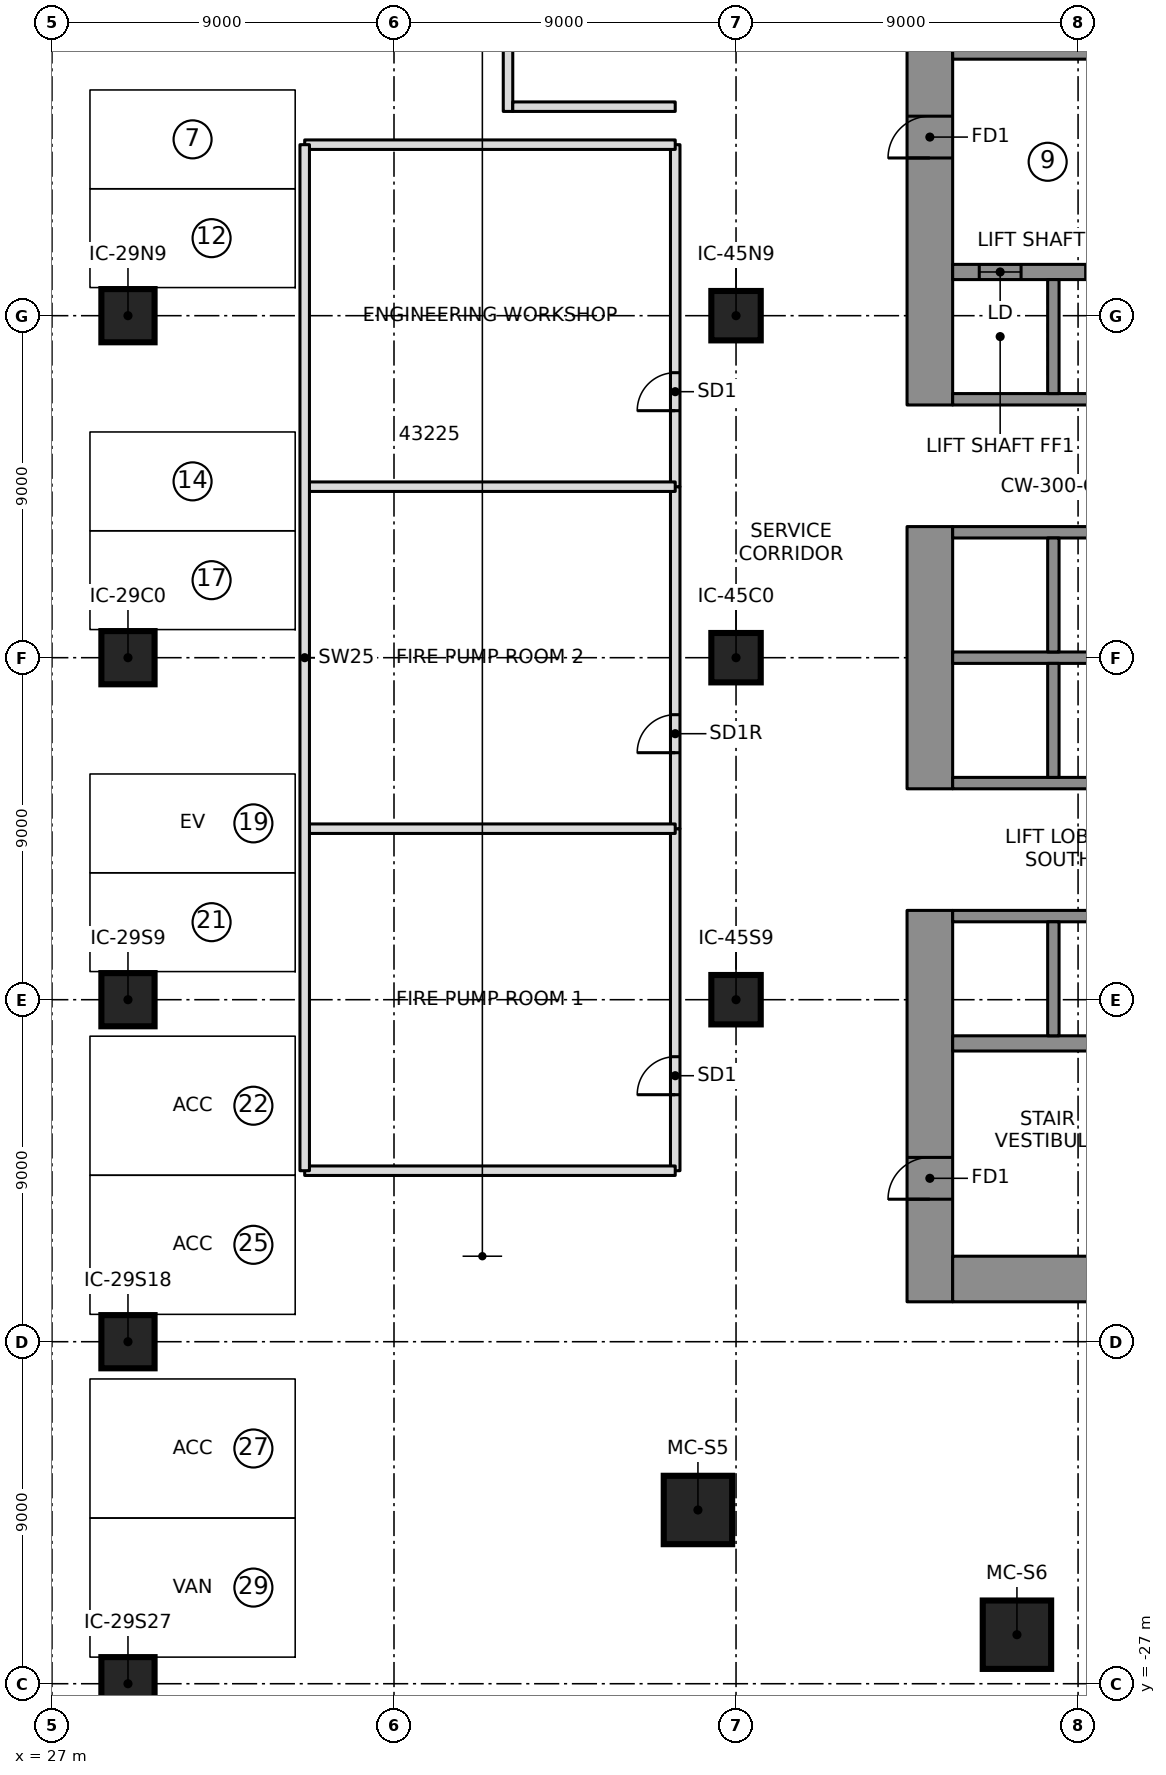
"""IFC4 building model, lengths in metres.
Left out: names, types, materials, properties, quantities, classifications, styles, units other than length and angle.
Written with IfcOpenShell. Run it as: python <this file> out.ifc"""

import sys

from ifc_helpers import new_model, si_unit, direction, frame, frame_2d, origin, origin_2d, place, context, subcontext, project, spatial, rectangle, extrude, element, fill, save


model = new_model("IFC4")
c1 = context("Model", 3, precision=1e-05, world=origin(), true_north=direction((0.0, 1.0)))
c2 = subcontext(c1, "Body", "Model", "MODEL_VIEW")
j1 = project(units=[si_unit("LENGTHUNIT", "METRE"), si_unit("PLANEANGLEUNIT", "RADIAN")], contexts=[c1])
p1 = place(None, origin())
s1 = spatial("IfcSite", under=j1, at=p1, CompositionType="ELEMENT")
p2 = place(p1, origin())
s2 = spatial("IfcBuilding", under=s1, at=p2, CompositionType="ELEMENT")
p3 = place(p2, frame((0.0, 0.0, -5.0)))
s3 = spatial("IfcBuildingStorey", under=s2, at=p3, CompositionType="ELEMENT", Elevation=-5.0)
p4 = place(p3, frame((50.1, 6.65, 0.0), z_axis=(0.0, 0.0, 1.0), x_axis=(0.0, 1.0, 0.0)))
e1 = element("IfcWall", 1, at=p4, inside=s3, PredefinedType="SHEAR", context=c2, shape_type="SweptSolid", body=[
    extrude(rectangle(XDim=10.3, YDim=1.2, at=frame_2d((5.15, 0.0))), origin(), (0.0, 0.0, 1.0), 5.0),
])
p5 = place(p4, frame((6.5, 0.0, 0.0)))
e2 = element("IfcOpeningElement", 2, at=p5, cuts=e1, PredefinedType="OPENING", context=c2, shape_type="SweptSolid", body=[
    extrude(rectangle(XDim=1.1, YDim=2.1, at=frame_2d((0.55, 1.05))), frame((0.0, 0.61, 0.0), z_axis=(0.0, -1.0, 0.0), x_axis=(1.0, 0.0, 0.0)), (0.0, 0.0, 1.0), 1.22),
])
p6 = place(p3, frame((50.1, -3.45, 0.0), z_axis=(0.0, 0.0, 1.0), x_axis=(0.0, 1.0, 0.0)))
e3 = element("IfcWall", 3, at=p6, inside=s3, PredefinedType="SHEAR", context=c2, shape_type="SweptSolid", body=[
    extrude(rectangle(XDim=6.9, YDim=1.2, at=frame_2d((3.45, 0.0))), origin(), (0.0, 0.0, 1.0), 5.0),
])
p7 = place(p3, frame((50.1, -16.95, 0.0), z_axis=(0.0, 0.0, 1.0), x_axis=(0.0, 1.0, 0.0)))
e4 = element("IfcWall", 4, at=p7, inside=s3, PredefinedType="SHEAR", context=c2, shape_type="SweptSolid", body=[
    extrude(rectangle(XDim=10.3, YDim=1.2, at=frame_2d((5.15, 0.0))), origin(), (0.0, 0.0, 1.0), 5.0),
])
p8 = place(p7, frame((2.7, 0.0, 0.0)))
e5 = element("IfcOpeningElement", 5, at=p8, cuts=e4, PredefinedType="OPENING", context=c2, shape_type="SweptSolid", body=[
    extrude(rectangle(XDim=1.1, YDim=2.1, at=frame_2d((0.55, 1.05))), frame((0.0, 0.61, 0.0), z_axis=(0.0, -1.0, 0.0), x_axis=(1.0, 0.0, 0.0)), (0.0, 0.0, 1.0), 1.22),
])
for number, where, z_axis, x_axis in (
    (6, (50.7, 16.35, 0.0), (0.0, 0.0, 1.0), (1.0, 0.0, 0.0)),
    (7, (50.7, -16.35, 0.0), (0.0, 0.0, 1.0), (1.0, 0.0, 0.0)),
):
    element("IfcWall", number, at=place(p3, frame(where, z_axis=z_axis, x_axis=x_axis)), inside=s3, PredefinedType="SHEAR", context=c2, shape_type="SweptSolid", body=[
        extrude(rectangle(XDim=15.06, YDim=1.2, at=frame_2d((7.53, 0.0))), origin(), (0.0, 0.0, 1.0), 5.0),
    ])
p9 = place(p3, frame((50.7, 10.15, 0.0), z_axis=(0.0, 0.0, 1.0), x_axis=(1.0, 0.0, 0.0)))
e8 = element("IfcWall", 8, at=p9, inside=s3, PredefinedType="SHEAR", context=c2, shape_type="SweptSolid", body=[
    extrude(rectangle(XDim=13.86, YDim=0.4, at=frame_2d((6.93, 0.0))), origin(), (0.0, 0.0, 1.0), 5.0),
])
p10 = place(p9, frame((0.7, 0.0, 0.0)))
e9 = element("IfcOpeningElement", 9, at=p10, cuts=e8, PredefinedType="OPENING", context=c2, shape_type="SweptSolid", body=[
    extrude(rectangle(XDim=1.1, YDim=2.1, at=frame_2d((0.55, 1.05))), frame((0.0, 0.21, 0.0), z_axis=(0.0, -1.0, 0.0), x_axis=(1.0, 0.0, 0.0)), (0.0, 0.0, 1.0), 0.42),
])
p11 = place(p9, frame((3.5, 0.0, 0.0)))
e10 = element("IfcOpeningElement", 10, at=p11, cuts=e8, PredefinedType="OPENING", context=c2, shape_type="SweptSolid", body=[
    extrude(rectangle(XDim=1.1, YDim=2.1, at=frame_2d((0.55, 1.05))), frame((0.0, 0.21, 0.0), z_axis=(0.0, -1.0, 0.0), x_axis=(1.0, 0.0, 0.0)), (0.0, 0.0, 1.0), 0.42),
])
p12 = place(p3, frame((50.7, -10.15, 0.0), z_axis=(0.0, 0.0, 1.0), x_axis=(1.0, 0.0, 0.0)))
e11 = element("IfcWall", 11, at=p12, inside=s3, PredefinedType="SHEAR", context=c2, shape_type="SweptSolid", body=[
    extrude(rectangle(XDim=13.86, YDim=0.4, at=frame_2d((6.93, 0.0))), origin(), (0.0, 0.0, 1.0), 5.0),
])
for number, where, z_axis, x_axis in (
    (12, (50.7, 0.0, 0.0), (0.0, 0.0, 1.0), (1.0, 0.0, 0.0)),
    (13, (50.7, 3.3, 0.0), (0.0, 0.0, 1.0), (1.0, 0.0, 0.0)),
    (14, (50.7, 6.8, 0.0), (0.0, 0.0, 1.0), (1.0, 0.0, 0.0)),
):
    element("IfcWall", number, at=place(p3, frame(where, z_axis=z_axis, x_axis=x_axis)), inside=s3, PredefinedType="SHEAR", context=c2, shape_type="SweptSolid", body=[
        extrude(rectangle(XDim=10.9, YDim=0.3, at=frame_2d((5.45, 0.0))), origin(), (0.0, 0.0, 1.0), 5.0),
    ])
for number, where, z_axis, x_axis in (
    (15, (53.35, 0.15, 0.0), (0.0, 0.0, 1.0), (0.0, 1.0, 0.0)),
    (16, (53.35, 6.95, 0.0), (0.0, 0.0, 1.0), (0.0, 1.0, 0.0)),
):
    element("IfcWall", number, at=place(p3, frame(where, z_axis=z_axis, x_axis=x_axis)), inside=s3, PredefinedType="SHEAR", context=c2, shape_type="SweptSolid", body=[
        extrude(rectangle(XDim=3.0, YDim=0.3, at=frame_2d((1.5, 0.0))), origin(), (0.0, 0.0, 1.0), 5.0),
    ])
p13 = place(p3, frame((50.7, -3.3, 0.0), z_axis=(0.0, 0.0, 1.0), x_axis=(1.0, 0.0, 0.0)))
e17 = element("IfcWall", 17, at=p13, inside=s3, PredefinedType="SHEAR", context=c2, shape_type="SweptSolid", body=[
    extrude(rectangle(XDim=10.9, YDim=0.3, at=frame_2d((5.45, 0.0))), origin(), (0.0, 0.0, 1.0), 5.0),
])
p14 = place(p3, frame((50.7, -6.8, 0.0), z_axis=(0.0, 0.0, 1.0), x_axis=(1.0, 0.0, 0.0)))
e18 = element("IfcWall", 18, at=p14, inside=s3, PredefinedType="SHEAR", context=c2, shape_type="SweptSolid", body=[
    extrude(rectangle(XDim=10.9, YDim=0.3, at=frame_2d((5.45, 0.0))), origin(), (0.0, 0.0, 1.0), 5.0),
])
p15 = place(p14, frame((6.3, 0.0, 0.0)))
e19 = element("IfcOpeningElement", 19, at=p15, cuts=e18, PredefinedType="OPENING", context=c2, shape_type="SweptSolid", body=[
    extrude(rectangle(XDim=1.1, YDim=2.1, at=frame_2d((0.55, 1.05))), frame((0.0, 0.16, 0.0), z_axis=(0.0, -1.0, 0.0), x_axis=(1.0, 0.0, 0.0)), (0.0, 0.0, 1.0), 0.32),
])
p16 = place(p14, frame((9.1, 0.0, 0.0)))
e20 = element("IfcOpeningElement", 20, at=p16, cuts=e18, PredefinedType="OPENING", context=c2, shape_type="SweptSolid", body=[
    extrude(rectangle(XDim=1.1, YDim=2.1, at=frame_2d((0.55, 1.05))), frame((0.0, 0.16, 0.0), z_axis=(0.0, -1.0, 0.0), x_axis=(1.0, 0.0, 0.0)), (0.0, 0.0, 1.0), 0.32),
])
for number, where, z_axis, x_axis in (
    (21, (53.35, -3.15, 0.0), (0.0, 0.0, 1.0), (0.0, 1.0, 0.0)),
    (22, (53.35, -9.95, 0.0), (0.0, 0.0, 1.0), (0.0, 1.0, 0.0)),
):
    element("IfcWall", number, at=place(p3, frame(where, z_axis=z_axis, x_axis=x_axis)), inside=s3, PredefinedType="SHEAR", context=c2, shape_type="SweptSolid", body=[
        extrude(rectangle(XDim=3.0, YDim=0.3, at=frame_2d((1.5, 0.0))), origin(), (0.0, 0.0, 1.0), 5.0),
    ])
for number, where, z_axis, x_axis in (
    (23, (43.998, -22.428, 0.0), (0.0, 0.0, 1.0), (1.0, 0.0, 0.0)),
    (24, (52.392, -25.71, 0.0), (0.0, 0.0, 1.0), (1.0, 0.0, 0.0)),
):
    element("IfcColumn", number, at=place(p3, frame(where, z_axis=z_axis, x_axis=x_axis)), inside=s3, PredefinedType="COLUMN", context=c2, shape_type="SweptSolid", body=[
        extrude(rectangle(XDim=1.8, YDim=1.8, at=origin_2d()), origin(), (0.0, 0.0, 1.0), 5.0),
    ])
for number, where, z_axis, x_axis in (
    (25, (29.0, -27.0, 0.0), (0.0, 0.0, 1.0), (1.0, 0.0, 0.0)),
    (26, (29.0, -18.0, 0.0), (0.0, 0.0, 1.0), (1.0, 0.0, 0.0)),
    (27, (29.0, -9.0, 0.0), (0.0, 0.0, 1.0), (1.0, 0.0, 0.0)),
    (28, (29.0, 0.0, 0.0), (0.0, 0.0, 1.0), (1.0, 0.0, 0.0)),
    (29, (29.0, 9.0, 0.0), (0.0, 0.0, 1.0), (1.0, 0.0, 0.0)),
):
    element("IfcColumn", number, at=place(p3, frame(where, z_axis=z_axis, x_axis=x_axis)), inside=s3, PredefinedType="COLUMN", context=c2, shape_type="SweptSolid", body=[
        extrude(rectangle(XDim=1.4, YDim=1.4, at=origin_2d()), origin(), (0.0, 0.0, 1.0), 4.35),
    ])
for number, where, z_axis, x_axis in (
    (30, (45.0, -9.0, 0.0), (0.0, 0.0, 1.0), (1.0, 0.0, 0.0)),
    (31, (45.0, 0.0, 0.0), (0.0, 0.0, 1.0), (1.0, 0.0, 0.0)),
    (32, (45.0, 9.0, 0.0), (0.0, 0.0, 1.0), (1.0, 0.0, 0.0)),
):
    element("IfcColumn", number, at=place(p3, frame(where, z_axis=z_axis, x_axis=x_axis)), inside=s3, PredefinedType="COLUMN", context=c2, shape_type="SweptSolid", body=[
        extrude(rectangle(XDim=1.3, YDim=1.3, at=origin_2d()), origin(), (0.0, 0.0, 1.0), 5.0),
    ])
p17 = place(p2, frame((0.0, 0.0, -10.0)))
s4 = spatial("IfcBuildingStorey", under=s2, at=p17, CompositionType="ELEMENT", Elevation=-10.0)
p18 = place(p17, frame((41.69, -21.429, -0.3), z_axis=(0.0, 0.0, 1.0), x_axis=(0.888406364692, -0.459057873449, 0.0)))
e33 = element("IfcWall", 33, at=p18, inside=s4, PredefinedType="SHEAR", context=c2, shape_type="SweptSolid", body=[
    extrude(rectangle(XDim=1.529, YDim=3.4, at=frame_2d((0.764, 0.0))), origin(), (0.0, 0.0, 1.0), 15.3),
])
p19 = place(p3, frame((43.4, -13.5, 0.0), z_axis=(0.0, 0.0, 1.0), x_axis=(0.0, 1.0, 0.0)))
e34 = element("IfcWall", 34, at=p19, inside=s3, PredefinedType="PARTITIONING", context=c2, shape_type="SweptSolid", body=[
    extrude(rectangle(XDim=9.0, YDim=0.25, at=frame_2d((4.5, 0.0))), origin(), (0.0, 0.0, 1.0), 4.65),
])
p20 = place(p19, frame((2.0, 0.0, 0.0)))
e35 = element("IfcOpeningElement", 35, at=p20, cuts=e34, PredefinedType="OPENING", context=c2, shape_type="SweptSolid", body=[
    extrude(rectangle(XDim=1.0, YDim=2.1, at=frame_2d((0.5, 1.05))), frame((0.0, 0.135, 0.0), z_axis=(0.0, -1.0, 0.0), x_axis=(1.0, 0.0, 0.0)), (0.0, 0.0, 1.0), 0.27),
])
p21 = place(p3, frame((43.4, -4.5, 0.0), z_axis=(0.0, 0.0, 1.0), x_axis=(0.0, 1.0, 0.0)))
e36 = element("IfcWall", 36, at=p21, inside=s3, PredefinedType="PARTITIONING", context=c2, shape_type="SweptSolid", body=[
    extrude(rectangle(XDim=9.0, YDim=0.25, at=frame_2d((4.5, 0.0))), origin(), (0.0, 0.0, 1.0), 4.65),
])
p22 = place(p21, frame((2.0, 0.0, 0.0)))
e37 = element("IfcOpeningElement", 37, at=p22, cuts=e36, PredefinedType="OPENING", context=c2, shape_type="SweptSolid", body=[
    extrude(rectangle(XDim=1.0, YDim=2.1, at=frame_2d((0.5, 1.05))), frame((0.0, 0.135, 0.0), z_axis=(0.0, -1.0, 0.0), x_axis=(1.0, 0.0, 0.0)), (0.0, 0.0, 1.0), 0.27),
])
p23 = place(p3, frame((33.65, -4.5, 0.0), z_axis=(0.0, 0.0, 1.0), x_axis=(1.0, 0.0, 0.0)))
e38 = element("IfcWall", 38, at=p23, inside=s3, PredefinedType="PARTITIONING", context=c2, shape_type="SweptSolid", body=[
    extrude(rectangle(XDim=9.75, YDim=0.25, at=frame_2d((4.875, 0.0))), origin(), (0.0, 0.0, 1.0), 4.65),
])
p24 = place(p3, frame((43.4, 4.5, 0.0), z_axis=(0.0, 0.0, 1.0), x_axis=(0.0, 1.0, 0.0)))
e39 = element("IfcWall", 39, at=p24, inside=s3, PredefinedType="PARTITIONING", context=c2, shape_type="SweptSolid", body=[
    extrude(rectangle(XDim=9.0, YDim=0.25, at=frame_2d((4.5, 0.0))), origin(), (0.0, 0.0, 1.0), 4.65),
])
p25 = place(p24, frame((2.0, 0.0, 0.0)))
e40 = element("IfcOpeningElement", 40, at=p25, cuts=e39, PredefinedType="OPENING", context=c2, shape_type="SweptSolid", body=[
    extrude(rectangle(XDim=1.0, YDim=2.1, at=frame_2d((0.5, 1.05))), frame((0.0, 0.135, 0.0), z_axis=(0.0, -1.0, 0.0), x_axis=(1.0, 0.0, 0.0)), (0.0, 0.0, 1.0), 0.27),
])
for number, where, z_axis, x_axis in (
    (41, (33.65, 4.5, 0.0), (0.0, 0.0, 1.0), (1.0, 0.0, 0.0)),
    (42, (33.65, -13.5, 0.0), (0.0, 0.0, 1.0), (1.0, 0.0, 0.0)),
    (43, (33.65, 13.5, 0.0), (0.0, 0.0, 1.0), (1.0, 0.0, 0.0)),
):
    element("IfcWall", number, at=place(p3, frame(where, z_axis=z_axis, x_axis=x_axis)), inside=s3, PredefinedType="PARTITIONING", context=c2, shape_type="SweptSolid", body=[
        extrude(rectangle(XDim=9.75, YDim=0.25, at=frame_2d((4.875, 0.0))), origin(), (0.0, 0.0, 1.0), 4.65),
    ])
p26 = place(p3, frame((33.65, -13.5, 0.0), z_axis=(0.0, 0.0, 1.0), x_axis=(0.0, 1.0, 0.0)))
e44 = element("IfcWall", 44, at=p26, inside=s3, PredefinedType="PARTITIONING", context=c2, shape_type="SweptSolid", body=[
    extrude(rectangle(XDim=27.0, YDim=0.25, at=frame_2d((13.5, 0.0))), origin(), (0.0, 0.0, 1.0), 4.65),
])
p27 = place(p3, frame((39.0, 14.375, 0.0), z_axis=(0.0, 0.0, 1.0), x_axis=(0.0, 1.0, 0.0)))
e45 = element("IfcWall", 45, at=p27, inside=s3, PredefinedType="PARTITIONING", context=c2, shape_type="SweptSolid", body=[
    extrude(rectangle(XDim=13.35, YDim=0.25, at=frame_2d((6.675, 0.0))), origin(), (0.0, 0.0, 1.0), 4.65),
])
p28 = place(p3, frame((39.125, 14.5, 0.0), z_axis=(0.0, 0.0, 1.0), x_axis=(1.0, 0.0, 0.0)))
e46 = element("IfcWall", 46, at=p28, inside=s3, PredefinedType="PARTITIONING", context=c2, shape_type="SweptSolid", body=[
    extrude(rectangle(XDim=4.275, YDim=0.25, at=frame_2d((2.137, 0.0))), origin(), (0.0, 0.0, 1.0), 4.65),
])
p29 = place(p10, origin())
e47 = element("IfcDoor", 47, at=p29, inside=s3, OperationType="DOUBLE_DOOR_SLIDING", PredefinedType="DOOR", context=c2, shape_type="SweptSolid", body=[
    extrude(rectangle(XDim=1.1, YDim=2.1, at=frame_2d((0.55, 1.05))), frame((0.0, 0.025, 0.0), z_axis=(0.0, -1.0, 0.0), x_axis=(1.0, 0.0, 0.0)), (0.0, 0.0, 1.0), 0.05),
])
fill(e9, e47)
p30 = place(p5, origin())
e48 = element("IfcDoor", 48, at=p30, inside=s3, OperationType="SINGLE_SWING_RIGHT", PredefinedType="DOOR", context=c2, shape_type="SweptSolid", body=[
    extrude(rectangle(XDim=1.1, YDim=2.1, at=frame_2d((0.55, 1.05))), frame((0.0, 0.025, 0.0), z_axis=(0.0, -1.0, 0.0), x_axis=(1.0, 0.0, 0.0)), (0.0, 0.0, 1.0), 0.05),
])
fill(e2, e48)
p31 = place(p8, origin())
e49 = element("IfcDoor", 49, at=p31, inside=s3, OperationType="SINGLE_SWING_RIGHT", PredefinedType="DOOR", context=c2, shape_type="SweptSolid", body=[
    extrude(rectangle(XDim=1.1, YDim=2.1, at=frame_2d((0.55, 1.05))), frame((0.0, 0.025, 0.0), z_axis=(0.0, -1.0, 0.0), x_axis=(1.0, 0.0, 0.0)), (0.0, 0.0, 1.0), 0.05),
])
fill(e5, e49)
p32 = place(p20, origin())
e50 = element("IfcDoor", 50, at=p32, inside=s3, OperationType="SINGLE_SWING_LEFT", PredefinedType="DOOR", context=c2, shape_type="SweptSolid", body=[
    extrude(rectangle(XDim=1.0, YDim=2.1, at=frame_2d((0.5, 1.05))), frame((0.0, 0.025, 0.0), z_axis=(0.0, -1.0, 0.0), x_axis=(1.0, 0.0, 0.0)), (0.0, 0.0, 1.0), 0.05),
])
fill(e35, e50)
p33 = place(p22, origin())
e51 = element("IfcDoor", 51, at=p33, inside=s3, OperationType="SINGLE_SWING_RIGHT", PredefinedType="DOOR", context=c2, shape_type="SweptSolid", body=[
    extrude(rectangle(XDim=1.0, YDim=2.1, at=frame_2d((0.5, 1.05))), frame((0.0, 0.025, 0.0), z_axis=(0.0, -1.0, 0.0), x_axis=(1.0, 0.0, 0.0)), (0.0, 0.0, 1.0), 0.05),
])
fill(e37, e51)
p34 = place(p25, origin())
e52 = element("IfcDoor", 52, at=p34, inside=s3, OperationType="SINGLE_SWING_LEFT", PredefinedType="DOOR", context=c2, shape_type="SweptSolid", body=[
    extrude(rectangle(XDim=1.0, YDim=2.1, at=frame_2d((0.5, 1.05))), frame((0.0, 0.025, 0.0), z_axis=(0.0, -1.0, 0.0), x_axis=(1.0, 0.0, 0.0)), (0.0, 0.0, 1.0), 0.05),
])
fill(e40, e52)
save(model, sys.argv[1])
